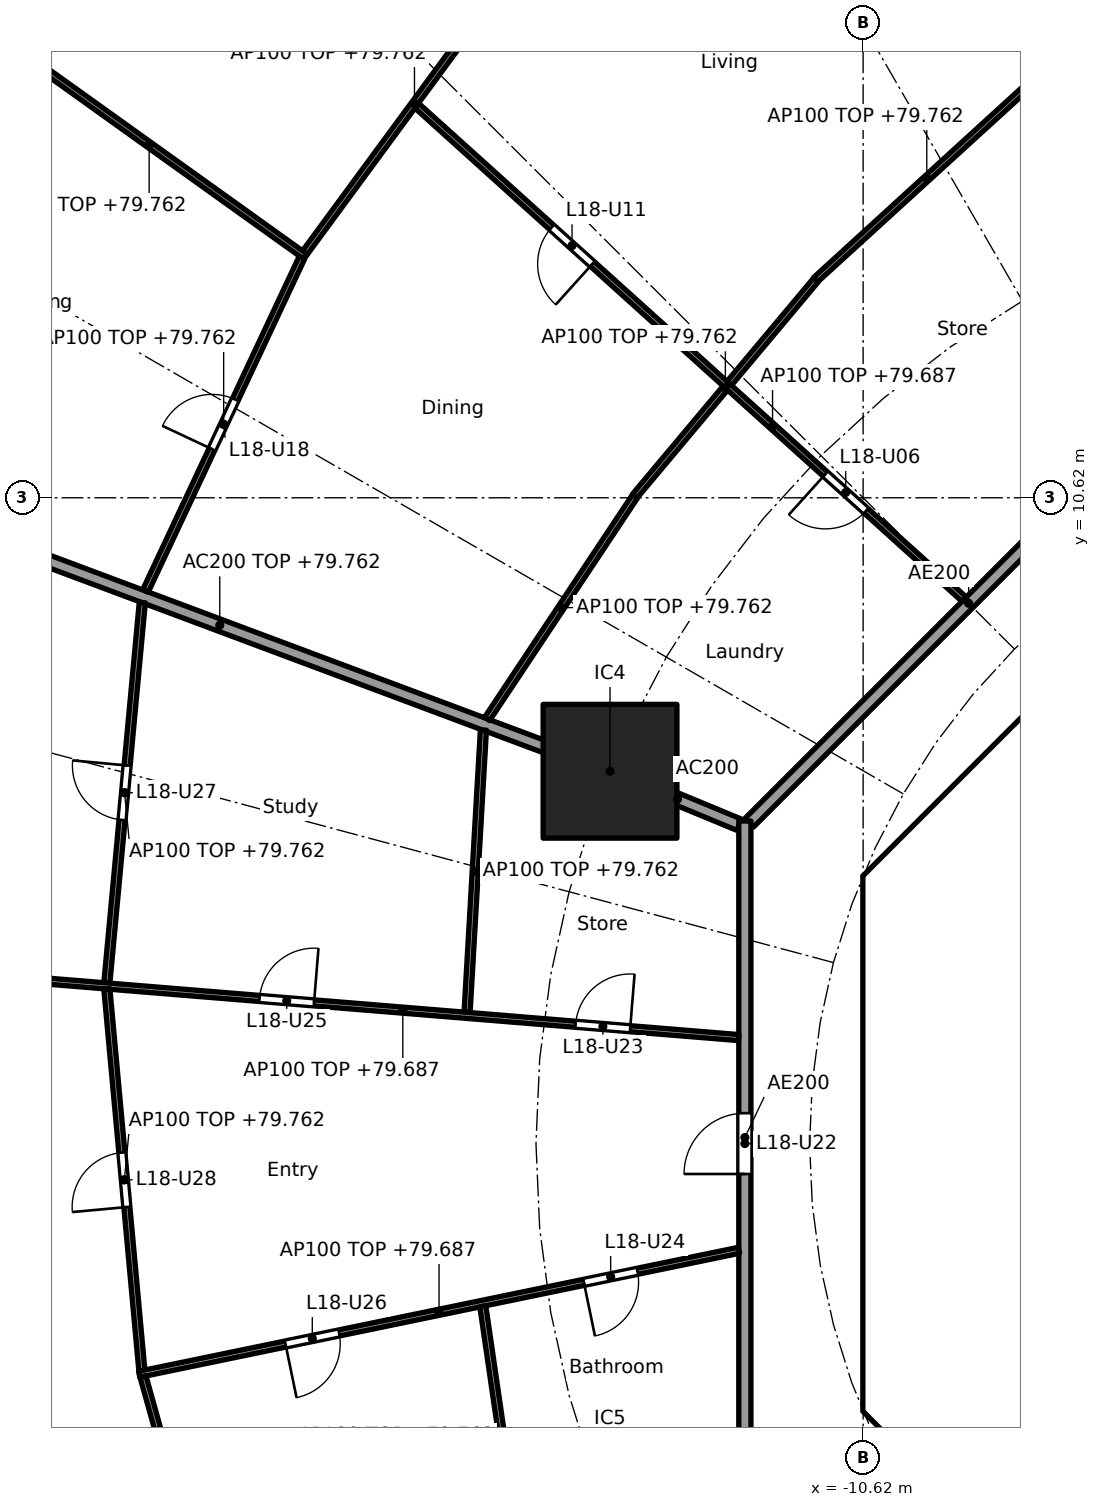
"""IFC4 building model, lengths in metres.
Left out: names, types, materials, properties, quantities, classifications, styles, units other than length and angle.
Written with IfcOpenShell. Run it as: python <this file> out.ifc"""

import sys

from ifc_helpers import new_model, si_unit, direction, frame, frame_2d, origin, origin_2d, place, context, subcontext, project, spatial, polyline, rectangle, outline, extrude, element, fill, save


model = new_model("IFC4")
c1 = context("Model", 3, precision=1e-05, world=origin(), true_north=direction((0.0, 1.0)))
c2 = subcontext(c1, "Body", "Model", "MODEL_VIEW")
j1 = project(units=[si_unit("LENGTHUNIT", "METRE"), si_unit("PLANEANGLEUNIT", "RADIAN")], contexts=[c1])
p1 = place(None, origin())
s1 = spatial("IfcSite", under=j1, at=p1, CompositionType="ELEMENT")
p2 = place(p1, origin())
s2 = spatial("IfcBuilding", under=s1, at=p2, CompositionType="ELEMENT")
p3 = place(p2, frame((0.0, 0.0, 77.0)))
s3 = spatial("IfcBuildingStorey", under=s2, at=p3, CompositionType="ELEMENT", Elevation=77.0)
p4 = place(p3, frame((-14.782, 6.123, 0.0), z_axis=(0.0, 0.0, 1.0), x_axis=(1.0, 0.0, 0.0)))
e1 = element("IfcColumn", 1, at=p4, inside=s3, PredefinedType="COLUMN", context=c2, shape_type="SweptSolid", body=[
    extrude(rectangle(XDim=2.2, YDim=2.2, at=origin_2d()), origin(), (0.0, 0.0, 1.0), 3.7),
])
p5 = place(p3, frame((-4.613, 9.988, 0.0), z_axis=(0.0, 0.0, 1.0), x_axis=(-0.707106781187, -0.707106781187, 0.0)))
e2 = element("IfcWall", 2, at=p5, inside=s3, PredefinedType="SHEAR", context=c2, shape_type="SweptSolid", body=[
    extrude(rectangle(XDim=7.602, YDim=0.6, at=frame_2d((3.801, 0.0))), origin(), (0.0, 0.0, 1.0), 3.44),
])
p6 = place(p5, frame((0.351, 0.0, 0.0)))
e3 = element("IfcOpeningElement", 3, at=p6, cuts=e2, PredefinedType="OPENING", context=c2, shape_type="SweptSolid", body=[
    extrude(rectangle(XDim=1.1, YDim=2.1, at=frame_2d((0.55, 1.05))), frame((0.0, 0.31, 0.0), z_axis=(0.0, -1.0, 0.0), x_axis=(1.0, 0.0, 0.0)), (0.0, 0.0, 1.0), 0.62),
])
p7 = place(p3, frame((-10.325, 3.801, 0.0), z_axis=(0.0, 0.0, 1.0), x_axis=(0.0, -1.0, 0.0)))
e4 = element("IfcWall", 4, at=p7, inside=s3, PredefinedType="SHEAR", context=c2, shape_type="SweptSolid", body=[
    extrude(rectangle(XDim=7.602, YDim=0.6, at=frame_2d((3.801, 0.0))), origin(), (0.0, 0.0, 1.0), 3.44),
])
p8 = place(p7, frame((0.651, 0.0, 0.0)))
e5 = element("IfcOpeningElement", 5, at=p8, cuts=e4, PredefinedType="OPENING", context=c2, shape_type="SweptSolid", body=[
    extrude(rectangle(XDim=1.5, YDim=2.1, at=frame_2d((0.75, 1.05))), frame((0.0, 0.31, 0.0), z_axis=(0.0, -1.0, 0.0), x_axis=(1.0, 0.0, 0.0)), (0.0, 0.0, 1.0), 0.62),
])
p9 = place(p7, frame((5.451, 0.0, 0.0)))
e6 = element("IfcOpeningElement", 6, at=p9, cuts=e4, PredefinedType="OPENING", context=c2, shape_type="SweptSolid", body=[
    extrude(rectangle(XDim=1.5, YDim=2.1, at=frame_2d((0.75, 1.05))), frame((0.0, 0.31, 0.0), z_axis=(0.0, -1.0, 0.0), x_axis=(1.0, 0.0, 0.0)), (0.0, 0.0, 1.0), 0.62),
])
p10 = place(p3, frame((-9.988, -4.613, 0.0), z_axis=(0.0, 0.0, 1.0), x_axis=(0.707106781187, -0.707106781187, 0.0)))
e7 = element("IfcWall", 7, at=p10, inside=s3, PredefinedType="SHEAR", context=c2, shape_type="SweptSolid", body=[
    extrude(rectangle(XDim=7.602, YDim=0.6, at=frame_2d((3.801, 0.0))), origin(), (0.0, 0.0, 1.0), 3.44),
])
p11 = place(p10, frame((6.151, 0.0, 0.0)))
e8 = element("IfcOpeningElement", 8, at=p11, cuts=e7, PredefinedType="OPENING", context=c2, shape_type="SweptSolid", body=[
    extrude(rectangle(XDim=1.1, YDim=2.1, at=frame_2d((0.55, 1.05))), frame((0.0, 0.31, 0.0), z_axis=(0.0, -1.0, 0.0), x_axis=(1.0, 0.0, 0.0)), (0.0, 0.0, 1.0), 0.62),
])
p12 = place(p3, origin())
e9 = element("IfcWall", 9, at=p12, inside=s3, PredefinedType="SHEAR", context=c2, shape_type="SweptSolid", body=[
    extrude(outline(polyline([(-10.625, -3.801), (-10.025, -3.801), (-10.025, -4.152), (-9.776, -4.401), (-10.2, -4.825), (-10.625, -4.401), (-10.625, -3.801)])), origin(), (0.0, 0.0, 1.0), 3.44),
])
p13 = place(p3, origin())
e10 = element("IfcWall", 10, at=p13, inside=s3, PredefinedType="SHEAR", context=c2, shape_type="SweptSolid", body=[
    extrude(outline(polyline([(-10.2, 4.825), (-9.776, 4.401), (-10.025, 4.152), (-10.025, 3.801), (-10.625, 3.801), (-10.625, 4.401), (-10.2, 4.825)])), origin(), (0.0, 0.0, 1.0), 3.44),
])
for number, where, z_axis, x_axis in (
    (11, (-10.025, -4.0, 0.0), (0.0, 0.0, 1.0), (1.0, 0.0, 0.0)),
    (12, (-10.025, 4.0, 0.0), (0.0, 0.0, 1.0), (1.0, 0.0, 0.0)),
):
    element("IfcWall", number, at=place(p3, frame(where, z_axis=z_axis, x_axis=x_axis)), inside=s3, PredefinedType="PARTITIONING", context=c2, shape_type="SweptSolid", body=[
        extrude(rectangle(XDim=3.325, YDim=0.2, at=frame_2d((1.662, 0.0))), origin(), (0.0, 0.0, 1.0), 3.44),
    ])
p14 = place(p3, frame((-8.301, 5.8, 0.0), z_axis=(0.0, 0.0, 1.0), x_axis=(1.0, 0.0, 0.0)))
e13 = element("IfcWall", 13, at=p14, inside=s3, PredefinedType="PARTITIONING", context=c2, shape_type="SweptSolid", body=[
    extrude(rectangle(XDim=2.026, YDim=0.15, at=frame_2d((1.013, 0.0))), origin(), (0.0, 0.0, 1.0), 3.44),
])
p15 = place(p3, frame((-12.657, 5.243, 0.0), z_axis=(0.0, 0.0, 1.0), x_axis=(-0.923843626288, 0.382770106157, 0.0)))
e14 = element("IfcWall", 14, at=p15, inside=s3, PredefinedType="PARTITIONING", context=c2, shape_type="SweptSolid", body=[
    extrude(rectangle(XDim=2.199, YDim=0.2, at=frame_2d((1.1, 0.0))), origin(), (0.0, 0.0, 1.0), 3.44),
])
p16 = place(p3, frame((-14.829, 6.14, 0.0), z_axis=(0.0, 0.0, 1.0), x_axis=(-0.936597324342, 0.35040755134, 0.0)))
e15 = element("IfcWall", 15, at=p16, inside=s3, PredefinedType="PARTITIONING", context=c2, shape_type="SweptSolid", body=[
    extrude(rectangle(XDim=13.606, YDim=0.2, at=frame_2d((6.803, 0.0))), origin(), (0.0, 0.0, 1.0), 2.762),
])
p17 = place(p3, frame((-5.275, 12.494, 0.0), z_axis=(0.0, 0.0, 1.0), x_axis=(-0.707106781187, -0.707106781187, 0.0)))
e16 = element("IfcWall", 16, at=p17, inside=s3, PredefinedType="PARTITIONING", context=c2, shape_type="SweptSolid", body=[
    extrude(rectangle(XDim=10.209, YDim=0.2, at=frame_2d((5.104, 0.0))), origin(), (0.0, 0.0, 1.0), 3.44),
])
p18 = place(p3, frame((-12.565, 5.304, 0.0), z_axis=(0.0, 0.0, 1.0), x_axis=(0.0, -1.0, 0.0)))
e17 = element("IfcWall", 17, at=p18, inside=s3, PredefinedType="PARTITIONING", context=c2, shape_type="SweptSolid", body=[
    extrude(rectangle(XDim=10.409, YDim=0.2, at=frame_2d((5.205, 0.0))), origin(), (0.0, 0.0, 1.0), 3.44),
])
p19 = place(p18, frame((4.804, 0.0, 0.0)))
e18 = element("IfcOpeningElement", 18, at=p19, cuts=e17, PredefinedType="OPENING", context=c2, shape_type="SweptSolid", body=[
    extrude(rectangle(XDim=1.0, YDim=2.1, at=frame_2d((0.5, 1.05))), frame((0.0, 0.11, 0.0), z_axis=(0.0, -1.0, 0.0), x_axis=(1.0, 0.0, 0.0)), (0.0, 0.0, 1.0), 0.22),
])
p20 = place(p3, frame((-6.072, 17.915, 0.0), z_axis=(0.0, 0.0, 1.0), x_axis=(-0.404139814253, 0.914697223422, 0.0)))
e19 = element("IfcWall", 19, at=p20, inside=s3, PredefinedType="PARTITIONING", context=c2, shape_type="SweptSolid", body=[
    extrude(rectangle(XDim=15.614, YDim=0.1, at=frame_2d((7.807, 0.0))), origin(), (0.0, 0.0, 1.0), 2.837),
])
p21 = place(p20, frame((3.226, 0.0, 0.0)))
e20 = element("IfcOpeningElement", 20, at=p21, cuts=e19, PredefinedType="OPENING", context=c2, shape_type="SweptSolid", body=[
    extrude(rectangle(XDim=0.9, YDim=2.1, at=frame_2d((0.45, 1.05))), frame((0.0, 0.06, 0.0), z_axis=(0.0, -1.0, 0.0), x_axis=(1.0, 0.0, 0.0)), (0.0, 0.0, 1.0), 0.12),
])
p22 = place(p3, frame((-7.746, 17.539, 0.0), z_axis=(0.0, 0.0, 1.0), x_axis=(-0.738860434967, -0.673858484877, 0.0)))
e21 = element("IfcWall", 21, at=p22, inside=s3, PredefinedType="PARTITIONING", context=c2, shape_type="SweptSolid", body=[
    extrude(rectangle(XDim=4.947, YDim=0.1, at=frame_2d((2.473, 0.0))), origin(), (0.0, 0.0, 1.0), 2.762),
])
p23 = place(p3, frame((-11.396, 14.202, 0.0), z_axis=(0.0, 0.0, 1.0), x_axis=(-0.642475660273, -0.766306091557, 0.0)))
e22 = element("IfcWall", 22, at=p23, inside=s3, PredefinedType="PARTITIONING", context=c2, shape_type="SweptSolid", body=[
    extrude(rectangle(XDim=4.637, YDim=0.1, at=frame_2d((2.319, 0.0))), origin(), (0.0, 0.0, 1.0), 2.762),
])
p24 = place(p3, frame((-16.197, 19.551, 0.0), z_axis=(0.0, 0.0, 1.0), x_axis=(-0.592391983588, -0.80564988536, 0.0)))
e23 = element("IfcWall", 23, at=p24, inside=s3, PredefinedType="PARTITIONING", context=c2, shape_type="SweptSolid", body=[
    extrude(rectangle(XDim=6.08, YDim=0.1, at=frame_2d((3.04, 0.0))), origin(), (0.0, 0.0, 1.0), 2.762),
])
p25 = place(p3, frame((-8.959, 8.952, 0.0), z_axis=(0.0, 0.0, 1.0), x_axis=(-0.742679904999, 0.669646592398, 0.0)))
e24 = element("IfcWall", 24, at=p25, inside=s3, PredefinedType="PARTITIONING", context=c2, shape_type="SweptSolid", body=[
    extrude(rectangle(XDim=12.121, YDim=0.1, at=frame_2d((6.061, 0.0))), origin(), (0.0, 0.0, 1.0), 2.687),
])
p26 = place(p25, frame((2.172, 0.0, 0.0)))
e25 = element("IfcOpeningElement", 25, at=p26, cuts=e24, PredefinedType="OPENING", context=c2, shape_type="SweptSolid", body=[
    extrude(rectangle(XDim=0.9, YDim=2.1, at=frame_2d((0.45, 1.05))), frame((0.0, 0.06, 0.0), z_axis=(0.0, -1.0, 0.0), x_axis=(1.0, 0.0, 0.0)), (0.0, 0.0, 1.0), 0.12),
])
p27 = place(p25, frame((8.233, 0.0, 0.0)))
e26 = element("IfcOpeningElement", 26, at=p27, cuts=e24, PredefinedType="OPENING", context=c2, shape_type="SweptSolid", body=[
    extrude(rectangle(XDim=0.9, YDim=2.1, at=frame_2d((0.45, 1.05))), frame((0.0, 0.06, 0.0), z_axis=(0.0, -1.0, 0.0), x_axis=(1.0, 0.0, 0.0)), (0.0, 0.0, 1.0), 0.12),
])
p28 = place(p3, frame((-14.371, 10.645, 0.0), z_axis=(0.0, 0.0, 1.0), x_axis=(-0.553341009285, -0.832954817168, 0.0)))
e27 = element("IfcWall", 27, at=p28, inside=s3, PredefinedType="PARTITIONING", context=c2, shape_type="SweptSolid", body=[
    extrude(rectangle(XDim=4.396, YDim=0.1, at=frame_2d((2.198, 0.0))), origin(), (0.0, 0.0, 1.0), 2.762),
])
p29 = place(p3, frame((-19.788, 14.583, 0.0), z_axis=(0.0, 0.0, 1.0), x_axis=(-0.813175286569, 0.58201885993, 0.0)))
e28 = element("IfcWall", 28, at=p29, inside=s3, PredefinedType="PARTITIONING", context=c2, shape_type="SweptSolid", body=[
    extrude(rectangle(XDim=6.329, YDim=0.1, at=frame_2d((3.164, 0.0))), origin(), (0.0, 0.0, 1.0), 2.762),
])
p30 = place(p3, frame((-19.85, 14.567, 0.0), z_axis=(0.0, 0.0, 1.0), x_axis=(-0.424942210745, -0.905220480064, 0.0)))
e29 = element("IfcWall", 29, at=p30, inside=s3, PredefinedType="PARTITIONING", context=c2, shape_type="SweptSolid", body=[
    extrude(rectangle(XDim=6.053, YDim=0.1, at=frame_2d((3.027, 0.0))), origin(), (0.0, 0.0, 1.0), 2.762),
])
p31 = place(p30, frame((2.577, 0.0, 0.0)))
e30 = element("IfcOpeningElement", 30, at=p31, cuts=e29, PredefinedType="OPENING", context=c2, shape_type="SweptSolid", body=[
    extrude(rectangle(XDim=0.9, YDim=2.1, at=frame_2d((0.45, 1.05))), frame((0.0, 0.06, 0.0), z_axis=(0.0, -1.0, 0.0), x_axis=(1.0, 0.0, 0.0)), (0.0, 0.0, 1.0), 0.12),
])
p32 = place(p3, frame((-16.865, 6.8, 0.0), z_axis=(0.0, 0.0, 1.0), x_axis=(-0.057758567218, -0.998330580476, 0.0)))
e31 = element("IfcWall", 31, at=p32, inside=s3, PredefinedType="PARTITIONING", context=c2, shape_type="SweptSolid", body=[
    extrude(rectangle(XDim=4.65, YDim=0.1, at=frame_2d((2.325, 0.0))), origin(), (0.0, 0.0, 1.0), 2.762),
])
p33 = place(p3, frame((-22.474, 8.898, 0.0), z_axis=(0.0, 0.0, 1.0), x_axis=(-0.092756864489, -0.995688788774, 0.0)))
e32 = element("IfcWall", 32, at=p33, inside=s3, PredefinedType="PARTITIONING", context=c2, shape_type="SweptSolid", body=[
    extrude(rectangle(XDim=6.283, YDim=0.1, at=frame_2d((3.141, 0.0))), origin(), (0.0, 0.0, 1.0), 2.762),
])
p34 = place(p33, frame((2.691, 0.0, 0.0)))
e33 = element("IfcOpeningElement", 33, at=p34, cuts=e32, PredefinedType="OPENING", context=c2, shape_type="SweptSolid", body=[
    extrude(rectangle(XDim=0.9, YDim=2.1, at=frame_2d((0.45, 1.05))), frame((0.0, 0.06, 0.0), z_axis=(0.0, -1.0, 0.0), x_axis=(1.0, 0.0, 0.0)), (0.0, 0.0, 1.0), 0.12),
])
p35 = place(p3, frame((-12.665, 1.743, 0.0), z_axis=(0.0, 0.0, 1.0), x_axis=(-0.996680482238, 0.081412630013, 0.0)))
e34 = element("IfcWall", 34, at=p35, inside=s3, PredefinedType="PARTITIONING", context=c2, shape_type="SweptSolid", body=[
    extrude(rectangle(XDim=15.84, YDim=0.1, at=frame_2d((7.92, 0.0))), origin(), (0.0, 0.0, 1.0), 2.687),
])
p36 = place(p35, frame((1.793, 0.0, 0.0)))
e35 = element("IfcOpeningElement", 35, at=p36, cuts=e34, PredefinedType="OPENING", context=c2, shape_type="SweptSolid", body=[
    extrude(rectangle(XDim=0.9, YDim=2.1, at=frame_2d((0.45, 1.05))), frame((0.0, 0.06, 0.0), z_axis=(0.0, -1.0, 0.0), x_axis=(1.0, 0.0, 0.0)), (0.0, 0.0, 1.0), 0.12),
])
p37 = place(p35, frame((7.009, 0.0, 0.0)))
e36 = element("IfcOpeningElement", 36, at=p37, cuts=e34, PredefinedType="OPENING", context=c2, shape_type="SweptSolid", body=[
    extrude(rectangle(XDim=0.9, YDim=2.1, at=frame_2d((0.45, 1.05))), frame((0.0, 0.06, 0.0), z_axis=(0.0, -1.0, 0.0), x_axis=(1.0, 0.0, 0.0)), (0.0, 0.0, 1.0), 0.12),
])
p38 = place(p3, frame((-23.057, 2.542, 0.0), z_axis=(0.0, 0.0, 1.0), x_axis=(0.091380945427, -0.995816008514, 0.0)))
e37 = element("IfcWall", 37, at=p38, inside=s3, PredefinedType="PARTITIONING", context=c2, shape_type="SweptSolid", body=[
    extrude(rectangle(XDim=6.302, YDim=0.1, at=frame_2d((3.151, 0.0))), origin(), (0.0, 0.0, 1.0), 2.762),
])
p39 = place(p38, frame((2.701, 0.0, 0.0)))
e38 = element("IfcOpeningElement", 38, at=p39, cuts=e37, PredefinedType="OPENING", context=c2, shape_type="SweptSolid", body=[
    extrude(rectangle(XDim=0.9, YDim=2.1, at=frame_2d((0.45, 1.05))), frame((0.0, 0.06, 0.0), z_axis=(0.0, -1.0, 0.0), x_axis=(1.0, 0.0, 0.0)), (0.0, 0.0, 1.0), 0.12),
])
p40 = place(p3, frame((-12.663, -1.755, 0.0), z_axis=(0.0, 0.0, 1.0), x_axis=(-0.979304677471, -0.202391572657, 0.0)))
e39 = element("IfcWall", 39, at=p40, inside=s3, PredefinedType="PARTITIONING", context=c2, shape_type="SweptSolid", body=[
    extrude(rectangle(XDim=10.071, YDim=0.1, at=frame_2d((5.036, 0.0))), origin(), (0.0, 0.0, 1.0), 2.687),
])
p41 = place(p40, frame((1.704, 0.0, 0.0)))
e40 = element("IfcOpeningElement", 40, at=p41, cuts=e39, PredefinedType="OPENING", context=c2, shape_type="SweptSolid", body=[
    extrude(rectangle(XDim=0.9, YDim=2.1, at=frame_2d((0.45, 1.05))), frame((0.0, 0.06, 0.0), z_axis=(0.0, -1.0, 0.0), x_axis=(1.0, 0.0, 0.0)), (0.0, 0.0, 1.0), 0.12),
])
p42 = place(p40, frame((6.714, 0.0, 0.0)))
e41 = element("IfcOpeningElement", 41, at=p42, cuts=e39, PredefinedType="OPENING", context=c2, shape_type="SweptSolid", body=[
    extrude(rectangle(XDim=0.9, YDim=2.1, at=frame_2d((0.45, 1.05))), frame((0.0, 0.06, 0.0), z_axis=(0.0, -1.0, 0.0), x_axis=(1.0, 0.0, 0.0)), (0.0, 0.0, 1.0), 0.12),
])
p43 = place(p3, frame((-16.874, -2.677, 0.0), z_axis=(0.0, 0.0, 1.0), x_axis=(0.144260658133, -0.989539722555, 0.0)))
e42 = element("IfcWall", 42, at=p43, inside=s3, PredefinedType="PARTITIONING", context=c2, shape_type="SweptSolid", body=[
    extrude(rectangle(XDim=4.309, YDim=0.1, at=frame_2d((2.154, 0.0))), origin(), (0.0, 0.0, 1.0), 2.762),
])
p44 = place(p3, frame((-22.463, -3.832, 0.0), z_axis=(0.0, 0.0, 1.0), x_axis=(0.269797759333, -0.962917010473, 0.0)))
e43 = element("IfcWall", 43, at=p44, inside=s3, PredefinedType="PARTITIONING", context=c2, shape_type="SweptSolid", body=[
    extrude(rectangle(XDim=6.043, YDim=0.1, at=frame_2d((3.021, 0.0))), origin(), (0.0, 0.0, 1.0), 2.762),
])
p45 = place(p8, origin())
e44 = element("IfcDoor", 44, at=p45, inside=s3, OperationType="DOUBLE_DOOR_SINGLE_SWING", PredefinedType="DOOR", context=c2, shape_type="SweptSolid", body=[
    extrude(rectangle(XDim=1.5, YDim=2.1, at=frame_2d((0.75, 1.05))), frame((0.0, 0.025, 0.0), z_axis=(0.0, -1.0, 0.0), x_axis=(1.0, 0.0, 0.0)), (0.0, 0.0, 1.0), 0.05),
])
fill(e5, e44)
p46 = place(p9, origin())
e45 = element("IfcDoor", 45, at=p46, inside=s3, OperationType="DOUBLE_DOOR_SINGLE_SWING", PredefinedType="DOOR", context=c2, shape_type="SweptSolid", body=[
    extrude(rectangle(XDim=1.5, YDim=2.1, at=frame_2d((0.75, 1.05))), frame((0.0, 0.025, 0.0), z_axis=(0.0, -1.0, 0.0), x_axis=(1.0, 0.0, 0.0)), (0.0, 0.0, 1.0), 0.05),
])
fill(e6, e45)
p47 = place(p26, origin())
e46 = element("IfcDoor", 46, at=p47, inside=s3, OperationType="SINGLE_SWING_RIGHT", PredefinedType="DOOR", context=c2, shape_type="SweptSolid", body=[
    extrude(rectangle(XDim=0.9, YDim=2.1, at=frame_2d((0.45, 1.05))), frame((0.0, 0.025, 0.0), z_axis=(0.0, -1.0, 0.0), x_axis=(1.0, 0.0, 0.0)), (0.0, 0.0, 1.0), 0.05),
])
fill(e25, e46)
p48 = place(p27, origin())
e47 = element("IfcDoor", 47, at=p48, inside=s3, OperationType="SINGLE_SWING_LEFT", PredefinedType="DOOR", context=c2, shape_type="SweptSolid", body=[
    extrude(rectangle(XDim=0.9, YDim=2.1, at=frame_2d((0.45, 1.05))), frame((0.0, 0.025, 0.0), z_axis=(0.0, -1.0, 0.0), x_axis=(1.0, 0.0, 0.0)), (0.0, 0.0, 1.0), 0.05),
])
fill(e26, e47)
p49 = place(p31, frame((0.9, 0.0, 0.0), x_axis=(-1.0, 0.0, 0.0)))
e48 = element("IfcDoor", 48, at=p49, inside=s3, OperationType="SINGLE_SWING_LEFT", PredefinedType="DOOR", context=c2, shape_type="SweptSolid", body=[
    extrude(rectangle(XDim=0.9, YDim=2.1, at=frame_2d((0.45, 1.05))), frame((0.0, 0.025, 0.0), z_axis=(0.0, -1.0, 0.0), x_axis=(1.0, 0.0, 0.0)), (0.0, 0.0, 1.0), 0.05),
])
fill(e30, e48)
p50 = place(p19, frame((1.0, 0.0, 0.0), x_axis=(-1.0, 0.0, 0.0)))
e49 = element("IfcDoor", 49, at=p50, inside=s3, OperationType="SINGLE_SWING_LEFT", PredefinedType="DOOR", context=c2, shape_type="SweptSolid", body=[
    extrude(rectangle(XDim=1.0, YDim=2.1, at=frame_2d((0.5, 1.05))), frame((0.0, 0.025, 0.0), z_axis=(0.0, -1.0, 0.0), x_axis=(1.0, 0.0, 0.0)), (0.0, 0.0, 1.0), 0.05),
])
fill(e18, e49)
p51 = place(p36, frame((0.9, 0.0, 0.0), x_axis=(-1.0, 0.0, 0.0)))
e50 = element("IfcDoor", 50, at=p51, inside=s3, OperationType="SINGLE_SWING_RIGHT", PredefinedType="DOOR", context=c2, shape_type="SweptSolid", body=[
    extrude(rectangle(XDim=0.9, YDim=2.1, at=frame_2d((0.45, 1.05))), frame((0.0, 0.025, 0.0), z_axis=(0.0, -1.0, 0.0), x_axis=(1.0, 0.0, 0.0)), (0.0, 0.0, 1.0), 0.05),
])
fill(e35, e50)
p52 = place(p41, origin())
e51 = element("IfcDoor", 51, at=p52, inside=s3, OperationType="SINGLE_SWING_RIGHT", PredefinedType="DOOR", context=c2, shape_type="SweptSolid", body=[
    extrude(rectangle(XDim=0.9, YDim=2.1, at=frame_2d((0.45, 1.05))), frame((0.0, 0.025, 0.0), z_axis=(0.0, -1.0, 0.0), x_axis=(1.0, 0.0, 0.0)), (0.0, 0.0, 1.0), 0.05),
])
fill(e40, e51)
p53 = place(p37, frame((0.9, 0.0, 0.0), x_axis=(-1.0, 0.0, 0.0)))
e52 = element("IfcDoor", 52, at=p53, inside=s3, OperationType="SINGLE_SWING_RIGHT", PredefinedType="DOOR", context=c2, shape_type="SweptSolid", body=[
    extrude(rectangle(XDim=0.9, YDim=2.1, at=frame_2d((0.45, 1.05))), frame((0.0, 0.025, 0.0), z_axis=(0.0, -1.0, 0.0), x_axis=(1.0, 0.0, 0.0)), (0.0, 0.0, 1.0), 0.05),
])
fill(e36, e52)
p54 = place(p42, origin())
e53 = element("IfcDoor", 53, at=p54, inside=s3, OperationType="SINGLE_SWING_RIGHT", PredefinedType="DOOR", context=c2, shape_type="SweptSolid", body=[
    extrude(rectangle(XDim=0.9, YDim=2.1, at=frame_2d((0.45, 1.05))), frame((0.0, 0.025, 0.0), z_axis=(0.0, -1.0, 0.0), x_axis=(1.0, 0.0, 0.0)), (0.0, 0.0, 1.0), 0.05),
])
fill(e41, e53)
p55 = place(p34, frame((0.9, 0.0, 0.0), x_axis=(-1.0, 0.0, 0.0)))
e54 = element("IfcDoor", 54, at=p55, inside=s3, OperationType="SINGLE_SWING_RIGHT", PredefinedType="DOOR", context=c2, shape_type="SweptSolid", body=[
    extrude(rectangle(XDim=0.9, YDim=2.1, at=frame_2d((0.45, 1.05))), frame((0.0, 0.025, 0.0), z_axis=(0.0, -1.0, 0.0), x_axis=(1.0, 0.0, 0.0)), (0.0, 0.0, 1.0), 0.05),
])
fill(e33, e54)
p56 = place(p39, frame((0.9, 0.0, 0.0), x_axis=(-1.0, 0.0, 0.0)))
e55 = element("IfcDoor", 55, at=p56, inside=s3, OperationType="SINGLE_SWING_LEFT", PredefinedType="DOOR", context=c2, shape_type="SweptSolid", body=[
    extrude(rectangle(XDim=0.9, YDim=2.1, at=frame_2d((0.45, 1.05))), frame((0.0, 0.025, 0.0), z_axis=(0.0, -1.0, 0.0), x_axis=(1.0, 0.0, 0.0)), (0.0, 0.0, 1.0), 0.05),
])
fill(e38, e55)
save(model, sys.argv[1])
